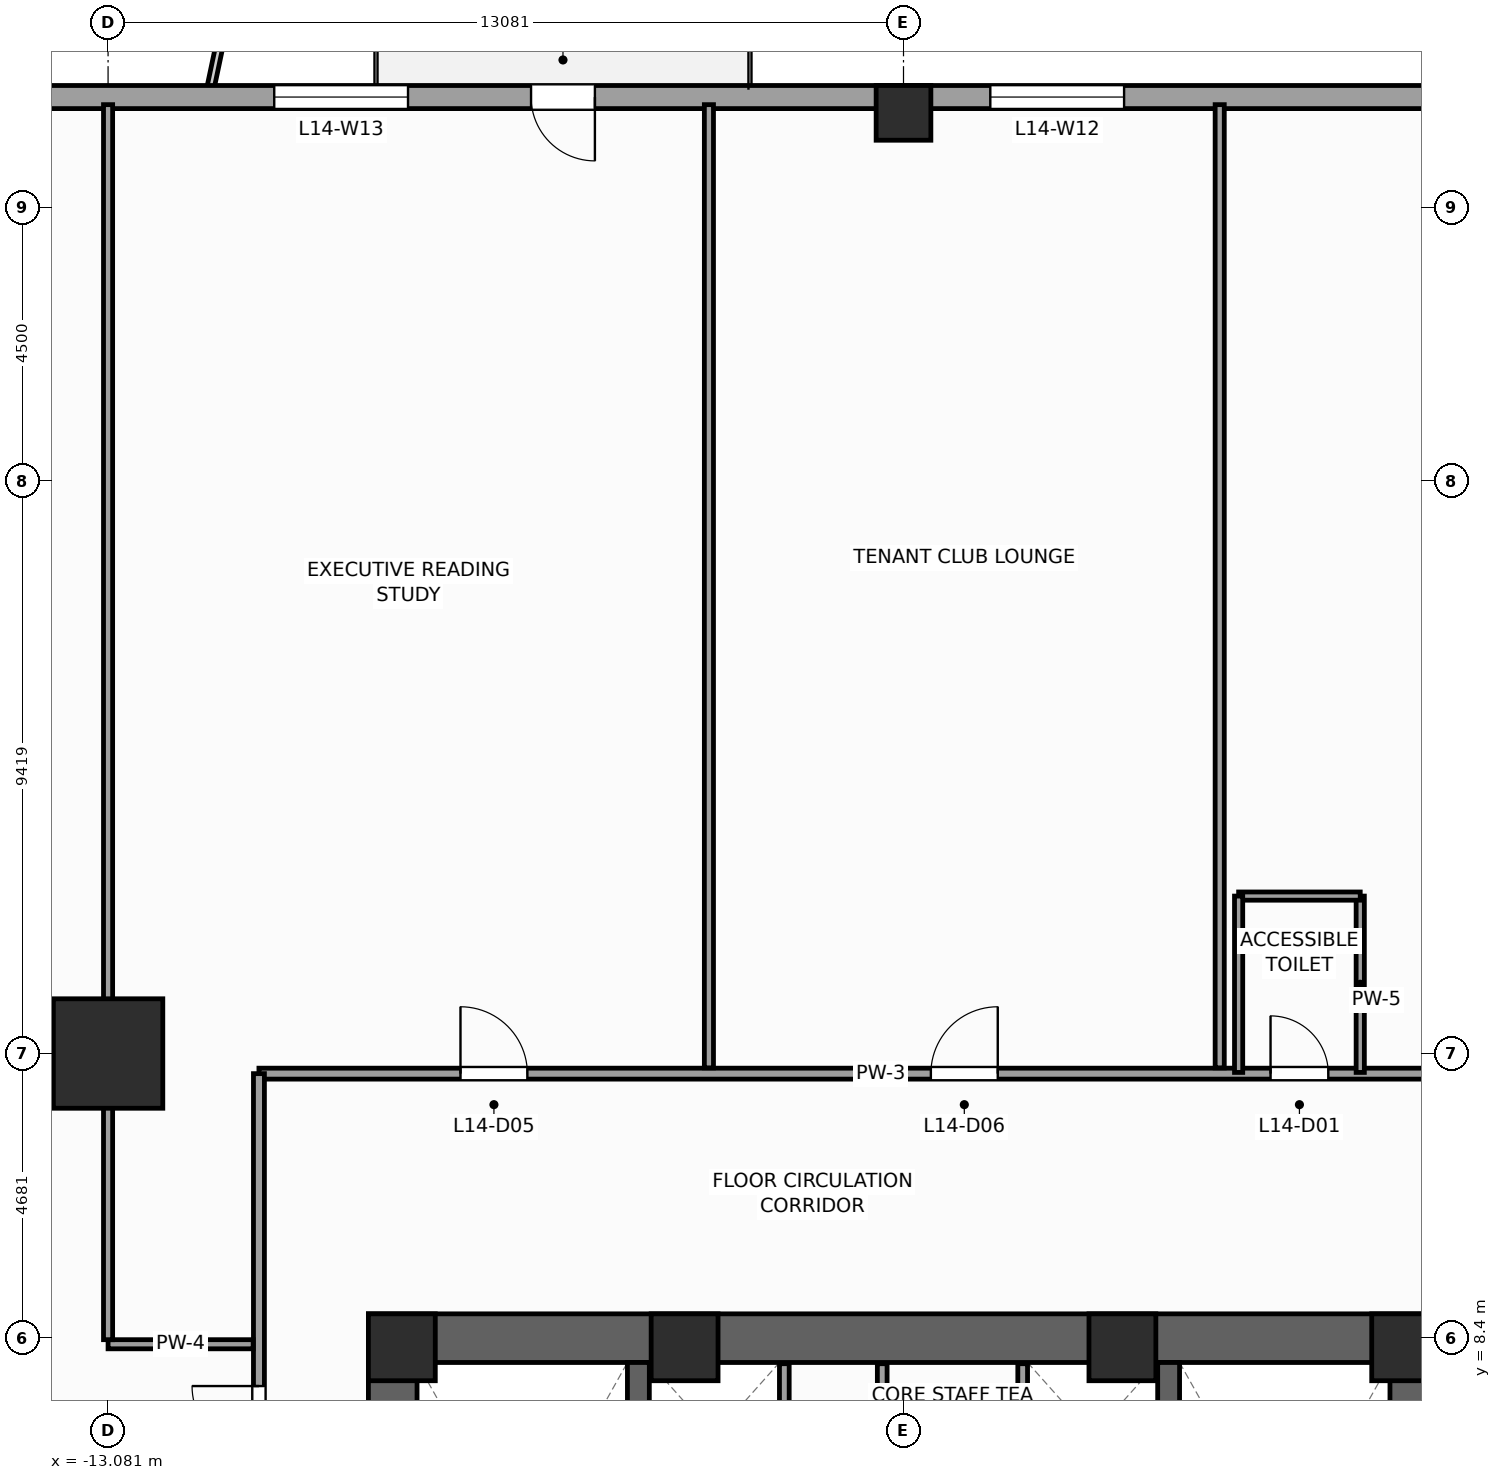
"""IFC4 building model, lengths in metres.
Left out: names, types, materials, properties, quantities, classifications, styles, units other than length and angle.
Written with IfcOpenShell. Run it as: python <this file> out.ifc"""

import sys

from ifc_helpers import new_model, si_unit, direction, frame, frame_2d, origin, origin_2d, place, context, subcontext, project, spatial, rectangle, extrude, source, transform, mapped, element, fill, save


model = new_model("IFC4")
c1 = context("Model", 3, precision=1e-05, world=origin(), true_north=direction((0.0, 1.0)))
c2 = subcontext(c1, "Body", "Model", "MODEL_VIEW")
j1 = project(units=[si_unit("LENGTHUNIT", "METRE"), si_unit("PLANEANGLEUNIT", "RADIAN")], contexts=[c1])
p1 = place(None, origin())
s1 = spatial("IfcSite", under=j1, at=p1, CompositionType="ELEMENT")
p2 = place(p1, origin())
s2 = spatial("IfcBuilding", under=s1, at=p2, CompositionType="ELEMENT")
p3 = place(p2, frame((0.0, 0.0, 62.0)))
s3 = spatial("IfcBuildingStorey", under=s2, at=p3, CompositionType="ELEMENT", Elevation=62.0)
p4 = place(p3, frame((-8.8, 8.4, 0.0), z_axis=(0.0, 0.0, 1.0), x_axis=(1.0, 0.0, 0.0)))
e1 = element("IfcWall", 1, at=p4, inside=s3, PredefinedType="SHEAR", context=c2, shape_type="SweptSolid", body=[
    extrude(rectangle(XDim=17.6, YDim=0.8, at=frame_2d((8.8, 0.0))), origin(), (0.0, 0.0, 1.0), 4.0),
])
p5 = place(p3, frame((-8.4, -8.0, 0.0), z_axis=(0.0, 0.0, 1.0), x_axis=(0.0, 1.0, 0.0)))
e2 = element("IfcWall", 2, at=p5, inside=s3, PredefinedType="SHEAR", context=c2, shape_type="SweptSolid", body=[
    extrude(rectangle(XDim=16.0, YDim=0.8, at=frame_2d((8.0, 0.0))), origin(), (0.0, 0.0, 1.0), 4.0),
])
p6 = place(p5, frame((4.69, 0.0, 0.0)))
e3 = element("IfcOpeningElement", 3, at=p6, cuts=e2, PredefinedType="OPENING", context=c2, shape_type="SweptSolid", body=[
    extrude(rectangle(XDim=1.3, YDim=2.2, at=frame_2d((0.65, 1.1))), frame((0.0, 0.41, 0.0), z_axis=(0.0, -1.0, 0.0), x_axis=(1.0, 0.0, 0.0)), (0.0, 0.0, 1.0), 0.82),
])
p7 = place(p3, frame((8.4, -8.0, 0.0), z_axis=(0.0, 0.0, 1.0), x_axis=(0.0, 1.0, 0.0)))
e4 = element("IfcWall", 4, at=p7, inside=s3, PredefinedType="SHEAR", context=c2, shape_type="SweptSolid", body=[
    extrude(rectangle(XDim=16.0, YDim=0.8, at=frame_2d((8.0, 0.0))), origin(), (0.0, 0.0, 1.0), 4.0),
])
p8 = place(p7, frame((4.69, 0.0, 0.0)))
e5 = element("IfcOpeningElement", 5, at=p8, cuts=e4, PredefinedType="OPENING", context=c2, shape_type="SweptSolid", body=[
    extrude(rectangle(XDim=1.3, YDim=2.2, at=frame_2d((0.65, 1.1))), frame((0.0, 0.41, 0.0), z_axis=(0.0, -1.0, 0.0), x_axis=(1.0, 0.0, 0.0)), (0.0, 0.0, 1.0), 0.82),
])
for number, where, z_axis, x_axis in (
    (6, (-4.36, -8.0, 0.0), (0.0, 0.0, 1.0), (0.0, 1.0, 0.0)),
    (7, (4.36, -8.0, 0.0), (0.0, 0.0, 1.0), (0.0, 1.0, 0.0)),
):
    element("IfcWall", number, at=place(p3, frame(where, z_axis=z_axis, x_axis=x_axis)), inside=s3, PredefinedType="SHEAR", context=c2, shape_type="SweptSolid", body=[
        extrude(rectangle(XDim=16.0, YDim=0.36, at=frame_2d((8.0, 0.0))), origin(), (0.0, 0.0, 1.0), 4.0),
    ])
m1 = source(origin(), c2, "Body", "SweptSolid", [
    extrude(rectangle(XDim=1.1, YDim=1.1, at=origin_2d()), origin(), (0.0, 0.0, 1.0), 4.0),
])
for number, where, z_axis, x_axis in (
    (8, (8.25, 8.25, 0.0), (0.0, 0.0, 1.0), (1.0, 0.0, 0.0)),
    (9, (-8.25, 8.25, 0.0), (0.0, 0.0, 1.0), (1.0, 0.0, 0.0)),
    (10, (-3.6, 8.25, 0.0), (0.0, 0.0, 1.0), (1.0, 0.0, 0.0)),
    (11, (3.6, 8.25, 0.0), (0.0, 0.0, 1.0), (1.0, 0.0, 0.0)),
):
    element("IfcColumn", number, at=place(p3, frame(where, z_axis=z_axis, x_axis=x_axis)), inside=s3, PredefinedType="PILASTER", context=c2, shape_type="MappedRepresentation", body=[
        mapped(m1, transform((0.0, 0.0, 0.0), scale=1.0)),
    ])
m2 = source(origin(), c2, "Body", "SweptSolid", [
    extrude(rectangle(XDim=1.8, YDim=1.8, at=origin_2d()), origin(), (0.0, 0.0, 1.0), 4.0),
])
p9 = place(p3, frame((-13.081, 13.081, 0.0), z_axis=(0.0, 0.0, 1.0), x_axis=(1.0, 0.0, 0.0)))
e12 = element("IfcColumn", 12, at=p9, inside=s3, PredefinedType="COLUMN", context=c2, shape_type="MappedRepresentation", body=[
    mapped(m2, transform((0.0, 0.0, 0.0), scale=1.0)),
])
m3 = source(origin(), c2, "Body", "SweptSolid", [
    extrude(rectangle(XDim=0.9, YDim=0.9, at=origin_2d()), origin(), (0.0, 0.0, 1.0), 4.0),
])
p10 = place(p3, frame((0.0, 28.55, 0.0), z_axis=(0.0, 0.0, 1.0), x_axis=(1.0, 0.0, 0.0)))
e13 = element("IfcColumn", 13, at=p10, inside=s3, PredefinedType="COLUMN", context=c2, shape_type="MappedRepresentation", body=[
    mapped(m3, transform((0.0, 0.0, 0.0), scale=1.0)),
])
p11 = place(p3, frame((25.69, 28.81, 0.0), z_axis=(0.0, 0.0, 1.0), x_axis=(-1.0, 0.0, 0.0)))
e14 = element("IfcWall", 14, at=p11, inside=s3, PredefinedType="STANDARD", context=c2, shape_type="SweptSolid", body=[
    extrude(rectangle(XDim=51.38, YDim=0.38, at=frame_2d((25.69, 0.0))), origin(), (0.0, 0.0, 1.0), 3.12),
])
p12 = place(p11, frame((30.765, 0.0, 0.0)))
e15 = element("IfcOpeningElement", 15, at=p12, cuts=e14, PredefinedType="OPENING", context=c2, shape_type="SweptSolid", body=[
    extrude(rectangle(XDim=1.05, YDim=2.25, at=frame_2d((0.525, 1.125))), frame((0.0, 0.2, 0.0), z_axis=(0.0, -1.0, 0.0), x_axis=(1.0, 0.0, 0.0)), (0.0, 0.0, 1.0), 0.4),
])
p13 = place(p11, frame((5.466, 0.0, 0.49)))
e16 = element("IfcOpeningElement", 16, at=p13, cuts=e14, PredefinedType="OPENING", context=c2, shape_type="SweptSolid", body=[
    extrude(rectangle(XDim=1.4, YDim=2.4, at=frame_2d((0.7, 1.2))), frame((0.0, 0.2, 0.0), z_axis=(0.0, -1.0, 0.0), x_axis=(1.0, 0.0, 0.0)), (0.0, 0.0, 1.0), 0.4),
])
p14 = place(p11, frame((13.8, 0.0, 0.49)))
e17 = element("IfcOpeningElement", 17, at=p14, cuts=e14, PredefinedType="OPENING", context=c2, shape_type="SweptSolid", body=[
    extrude(rectangle(XDim=2.2, YDim=2.4, at=frame_2d((1.1, 1.2))), frame((0.0, 0.2, 0.0), z_axis=(0.0, -1.0, 0.0), x_axis=(1.0, 0.0, 0.0)), (0.0, 0.0, 1.0), 0.4),
])
p15 = place(p11, frame((22.062, 0.0, 0.49)))
e18 = element("IfcOpeningElement", 18, at=p15, cuts=e14, PredefinedType="OPENING", context=c2, shape_type="SweptSolid", body=[
    extrude(rectangle(XDim=2.2, YDim=2.4, at=frame_2d((1.1, 1.2))), frame((0.0, 0.2, 0.0), z_axis=(0.0, -1.0, 0.0), x_axis=(1.0, 0.0, 0.0)), (0.0, 0.0, 1.0), 0.4),
])
p16 = place(p11, frame((33.838, 0.0, 0.49)))
e19 = element("IfcOpeningElement", 19, at=p16, cuts=e14, PredefinedType="OPENING", context=c2, shape_type="SweptSolid", body=[
    extrude(rectangle(XDim=2.2, YDim=2.4, at=frame_2d((1.1, 1.2))), frame((0.0, 0.2, 0.0), z_axis=(0.0, -1.0, 0.0), x_axis=(1.0, 0.0, 0.0)), (0.0, 0.0, 1.0), 0.4),
])
p17 = place(p11, frame((43.487, 0.0, 0.49)))
e20 = element("IfcOpeningElement", 20, at=p17, cuts=e14, PredefinedType="OPENING", context=c2, shape_type="SweptSolid", body=[
    extrude(rectangle(XDim=1.4, YDim=2.4, at=frame_2d((0.7, 1.2))), frame((0.0, 0.2, 0.0), z_axis=(0.0, -1.0, 0.0), x_axis=(1.0, 0.0, 0.0)), (0.0, 0.0, 1.0), 0.4),
])
for number, where, z_axis, x_axis in (
    (21, (-1.96, 4.58, 0.0), (0.0, 0.0, 1.0), (0.0, 1.0, 0.0)),
    (22, (1.96, 4.58, 0.0), (0.0, 0.0, 1.0), (0.0, 1.0, 0.0)),
):
    element("IfcWall", number, at=place(p3, frame(where, z_axis=z_axis, x_axis=x_axis)), inside=s3, PredefinedType="PARTITIONING", context=c2, shape_type="SweptSolid", body=[
        extrude(rectangle(XDim=3.4, YDim=0.16, at=frame_2d((1.7, 0.0))), origin(), (0.0, 0.0, 1.0), 3.72),
    ])
p18 = place(p3, frame((-0.35, 4.6, 0.0), z_axis=(0.0, 0.0, 1.0), x_axis=(0.0, 1.0, 0.0)))
e23 = element("IfcWall", 23, at=p18, inside=s3, PredefinedType="PARTITIONING", context=c2, shape_type="SweptSolid", body=[
    extrude(rectangle(XDim=3.38, YDim=0.16, at=frame_2d((1.69, 0.0))), origin(), (0.0, 0.0, 1.0), 3.72),
])
p19 = place(p3, frame((-10.6, 12.75, 0.0), z_axis=(0.0, 0.0, 1.0), x_axis=(1.0, 0.0, 0.0)))
e24 = element("IfcWall", 24, at=p19, inside=s3, PredefinedType="PARTITIONING", context=c2, shape_type="SweptSolid", body=[
    extrude(rectangle(XDim=21.2, YDim=0.18, at=frame_2d((10.6, 0.0))), origin(), (0.0, 0.0, 1.0), 3.72),
])
p20 = place(p19, frame((16.636, 0.0, 0.0)))
e25 = element("IfcOpeningElement", 25, at=p20, cuts=e24, PredefinedType="OPENING", context=c2, shape_type="SweptSolid", body=[
    extrude(rectangle(XDim=0.95, YDim=2.1, at=frame_2d((0.475, 1.05))), frame((0.0, 0.1, 0.0), z_axis=(0.0, -1.0, 0.0), x_axis=(1.0, 0.0, 0.0)), (0.0, 0.0, 1.0), 0.2),
])
p21 = place(p19, frame((3.314, 0.0, 0.0)))
e26 = element("IfcOpeningElement", 26, at=p21, cuts=e24, PredefinedType="OPENING", context=c2, shape_type="SweptSolid", body=[
    extrude(rectangle(XDim=1.1, YDim=2.2, at=frame_2d((0.55, 1.1))), frame((0.0, 0.1, 0.0), z_axis=(0.0, -1.0, 0.0), x_axis=(1.0, 0.0, 0.0)), (0.0, 0.0, 1.0), 0.2),
])
p22 = place(p19, frame((11.05, 0.0, 0.0)))
e27 = element("IfcOpeningElement", 27, at=p22, cuts=e24, PredefinedType="OPENING", context=c2, shape_type="SweptSolid", body=[
    extrude(rectangle(XDim=1.1, YDim=2.2, at=frame_2d((0.55, 1.1))), frame((0.0, 0.1, 0.0), z_axis=(0.0, -1.0, 0.0), x_axis=(1.0, 0.0, 0.0)), (0.0, 0.0, 1.0), 0.2),
])
p23 = place(p3, frame((-10.6, 3.35, 0.0), z_axis=(0.0, 0.0, 1.0), x_axis=(0.0, 1.0, 0.0)))
e28 = element("IfcWall", 28, at=p23, inside=s3, PredefinedType="PARTITIONING", context=c2, shape_type="SweptSolid", body=[
    extrude(rectangle(XDim=9.4, YDim=0.18, at=frame_2d((4.7, 0.0))), origin(), (0.0, 0.0, 1.0), 3.72),
])
p24 = place(p23, frame((3.163, 0.0, 0.0)))
e29 = element("IfcOpeningElement", 29, at=p24, cuts=e28, PredefinedType="OPENING", context=c2, shape_type="SweptSolid", body=[
    extrude(rectangle(XDim=1.1, YDim=2.2, at=frame_2d((0.55, 1.1))), frame((0.0, 0.1, 0.0), z_axis=(0.0, -1.0, 0.0), x_axis=(1.0, 0.0, 0.0)), (0.0, 0.0, 1.0), 0.2),
])
p25 = place(p3, frame((-10.695, 8.3, 0.0), z_axis=(0.0, 0.0, 1.0), x_axis=(-1.0, 0.0, 0.0)))
e30 = element("IfcWall", 30, at=p25, inside=s3, PredefinedType="PARTITIONING", context=c2, shape_type="SweptSolid", body=[
    extrude(rectangle(XDim=2.386, YDim=0.15, at=frame_2d((1.193, 0.0))), origin(), (0.0, 0.0, 1.0), 3.72),
])
p26 = place(p3, frame((-13.081, 8.375, 0.0), z_axis=(0.0, 0.0, 1.0), x_axis=(0.0, 1.0, 0.0)))
e31 = element("IfcWall", 31, at=p26, inside=s3, PredefinedType="PARTITIONING", context=c2, shape_type="SweptSolid", body=[
    extrude(rectangle(XDim=20.31, YDim=0.15, at=frame_2d((10.155, 0.0))), origin(), (0.0, 0.0, 1.0), 2.712),
])
for number, where, z_axis, x_axis in (
    (32, (-3.2, 12.845, 0.0), (0.0, 0.0, 1.0), (0.0, 1.0, 0.0)),
    (33, (5.2, 12.845, 0.0), (0.0, 0.0, 1.0), (0.0, 1.0, 0.0)),
):
    element("IfcWall", number, at=place(p3, frame(where, z_axis=z_axis, x_axis=x_axis)), inside=s3, PredefinedType="PARTITIONING", context=c2, shape_type="SweptSolid", body=[
        extrude(rectangle(XDim=15.84, YDim=0.15, at=frame_2d((7.92, 0.0))), origin(), (0.0, 0.0, 1.0), 3.72),
    ])
p27 = place(p3, frame((7.511, 12.77, 0.0), z_axis=(0.0, 0.0, 1.0), x_axis=(0.0, 1.0, 0.0)))
e34 = element("IfcWall", 34, at=p27, inside=s3, PredefinedType="PARTITIONING", context=c2, shape_type="SweptSolid", body=[
    extrude(rectangle(XDim=2.9, YDim=0.135, at=frame_2d((1.45, 0.0))), origin(), (0.0, 0.0, 1.0), 3.72),
])
p28 = place(p3, frame((5.511, 15.67, 0.0), z_axis=(0.0, 0.0, 1.0), x_axis=(1.0, 0.0, 0.0)))
e35 = element("IfcWall", 35, at=p28, inside=s3, PredefinedType="PARTITIONING", context=c2, shape_type="SweptSolid", body=[
    extrude(rectangle(XDim=2.0, YDim=0.135, at=frame_2d((1.0, 0.0))), origin(), (0.0, 0.0, 1.0), 3.22),
])
p29 = place(p3, frame((5.511, 12.77, 0.0), z_axis=(0.0, 0.0, 1.0), x_axis=(0.0, 1.0, 0.0)))
e36 = element("IfcWall", 36, at=p29, inside=s3, PredefinedType="PARTITIONING", context=c2, shape_type="SweptSolid", body=[
    extrude(rectangle(XDim=2.9, YDim=0.135, at=frame_2d((1.45, 0.0))), origin(), (0.0, 0.0, 1.0), 3.72),
])
m4 = source(origin(), c2, "Body", "SweptSolid", [
    extrude(rectangle(XDim=1.05, YDim=2.25, at=frame_2d((0.525, 1.125))), frame((0.0, 0.025, 0.0), z_axis=(0.0, -1.0, 0.0), x_axis=(1.0, 0.0, 0.0)), (0.0, 0.0, 1.0), 0.05),
])
p30 = place(p12, origin())
e37 = element("IfcDoor", 37, at=p30, inside=s3, OperationType="SINGLE_SWING_LEFT", PredefinedType="DOOR", context=c2, shape_type="MappedRepresentation", body=[
    mapped(m4, transform((0.0, 0.0, 0.0), scale=1.0)),
])
fill(e15, e37)
m5 = source(origin(), c2, "Body", "SweptSolid", [
    extrude(rectangle(XDim=2.2, YDim=2.4, at=frame_2d((1.1, 1.2))), frame((0.0, 0.03, 0.0), z_axis=(0.0, -1.0, 0.0), x_axis=(1.0, 0.0, 0.0)), (0.0, 0.0, 1.0), 0.06),
])
p31 = place(p15, origin())
e38 = element("IfcWindow", 38, at=p31, inside=s3, PartitioningType="SINGLE_PANEL", PredefinedType="WINDOW", context=c2, shape_type="MappedRepresentation", body=[
    mapped(m5, transform((0.0, 0.0, 0.0), scale=1.0)),
])
fill(e18, e38)
p32 = place(p16, origin())
e39 = element("IfcWindow", 39, at=p32, inside=s3, PartitioningType="SINGLE_PANEL", PredefinedType="WINDOW", context=c2, shape_type="MappedRepresentation", body=[
    mapped(m5, transform((0.0, 0.0, 0.0), scale=1.0)),
])
fill(e19, e39)
m6 = source(origin(), c2, "Body", "SweptSolid", [
    extrude(rectangle(XDim=0.95, YDim=2.1, at=frame_2d((0.475, 1.05))), frame((0.0, 0.025, 0.0), z_axis=(0.0, -1.0, 0.0), x_axis=(1.0, 0.0, 0.0)), (0.0, 0.0, 1.0), 0.05),
])
p33 = place(p20, origin())
e40 = element("IfcDoor", 40, at=p33, inside=s3, OperationType="SINGLE_SWING_LEFT", PredefinedType="DOOR", context=c2, shape_type="MappedRepresentation", body=[
    mapped(m6, transform((0.0, 0.0, 0.0), scale=1.0)),
])
fill(e25, e40)
m7 = source(origin(), c2, "Body", "SweptSolid", [
    extrude(rectangle(XDim=1.1, YDim=2.2, at=frame_2d((0.55, 1.1))), frame((0.0, 0.025, 0.0), z_axis=(0.0, -1.0, 0.0), x_axis=(1.0, 0.0, 0.0)), (0.0, 0.0, 1.0), 0.05),
])
p34 = place(p24, origin())
e41 = element("IfcDoor", 41, at=p34, inside=s3, OperationType="SINGLE_SWING_RIGHT", PredefinedType="DOOR", context=c2, shape_type="MappedRepresentation", body=[
    mapped(m7, transform((0.0, 0.0, 0.0), scale=1.0)),
])
fill(e29, e41)
p35 = place(p21, origin())
e42 = element("IfcDoor", 42, at=p35, inside=s3, OperationType="SINGLE_SWING_LEFT", PredefinedType="DOOR", context=c2, shape_type="MappedRepresentation", body=[
    mapped(m7, transform((0.0, 0.0, 0.0), scale=1.0)),
])
fill(e26, e42)
p36 = place(p22, origin())
e43 = element("IfcDoor", 43, at=p36, inside=s3, OperationType="SINGLE_SWING_RIGHT", PredefinedType="DOOR", context=c2, shape_type="MappedRepresentation", body=[
    mapped(m7, transform((0.0, 0.0, 0.0), scale=1.0)),
])
fill(e27, e43)
save(model, sys.argv[1])
